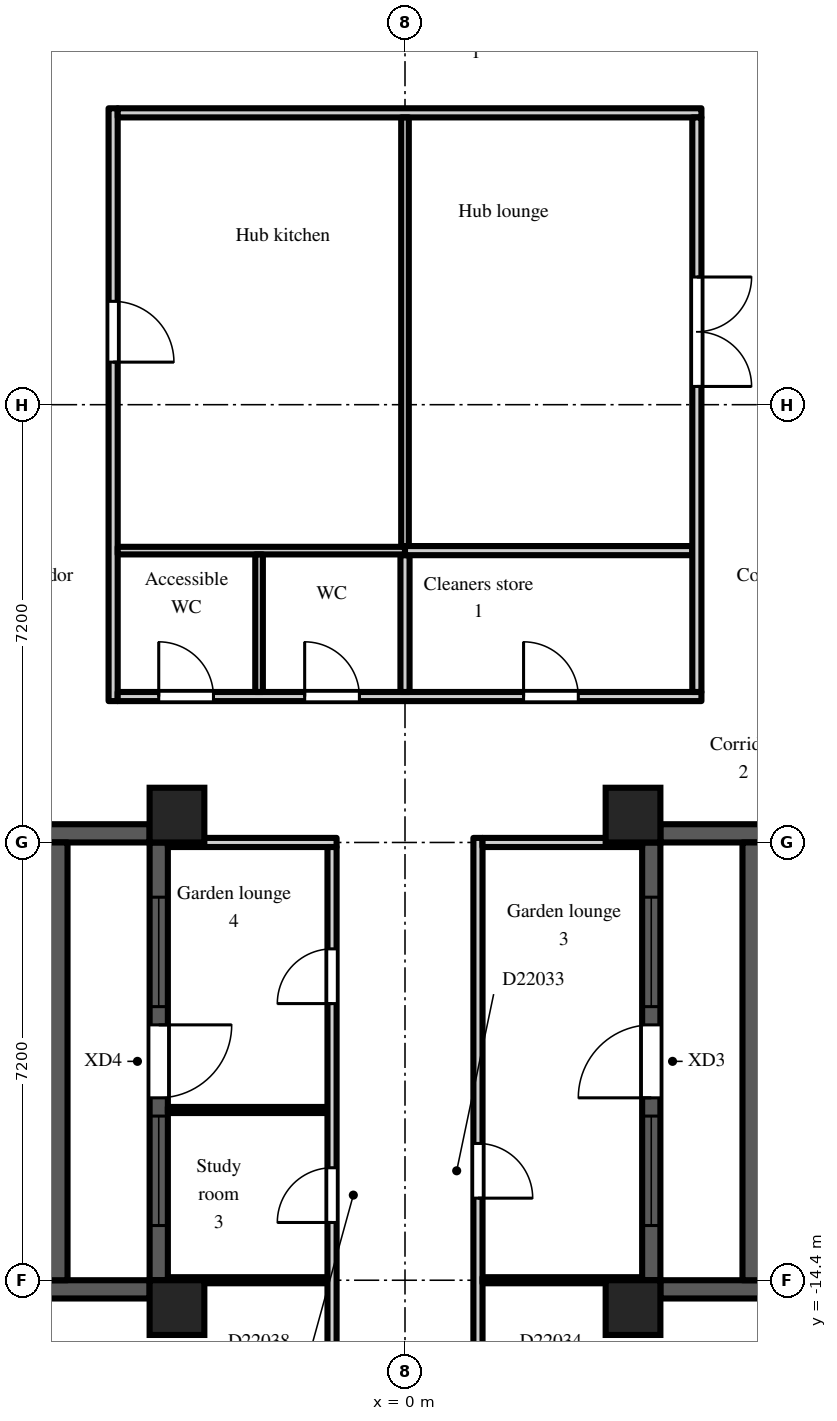
"""IFC4 building model, lengths in metres.
Left out: names, types, materials, properties, quantities, classifications, styles, units other than length and angle.
Written with IfcOpenShell. Run it as: python <this file> out.ifc"""

import sys

from ifc_helpers import new_model, si_unit, direction, frame, frame_2d, origin, origin_2d, place, context, subcontext, project, spatial, rectangle, extrude, element, fill, save


model = new_model("IFC4")
c1 = context("Model", 3, precision=1e-05, world=origin(), true_north=direction((0.0, 1.0)))
c2 = subcontext(c1, "Body", "Model", "MODEL_VIEW")
j1 = project(units=[si_unit("LENGTHUNIT", "METRE"), si_unit("PLANEANGLEUNIT", "RADIAN")], contexts=[c1])
p1 = place(None, origin())
s1 = spatial("IfcSite", under=j1, at=p1, CompositionType="ELEMENT")
p2 = place(p1, origin())
s2 = spatial("IfcBuilding", under=s1, at=p2, CompositionType="ELEMENT")
p3 = place(p2, frame((0.0, 0.0, 159.3)))
s3 = spatial("IfcBuildingStorey", under=s2, at=p3, CompositionType="ELEMENT", Elevation=159.3)
for number, where, z_axis, x_axis in (
    (1, (-3.75, -14.85, 0.0), (0.0, 0.0, 1.0), (1.0, 0.0, 0.0)),
    (2, (-3.75, -6.75, 0.0), (0.0, 0.0, 1.0), (1.0, 0.0, 0.0)),
    (3, (3.75, -14.85, 0.0), (0.0, 0.0, 1.0), (1.0, 0.0, 0.0)),
    (4, (3.75, -6.75, 0.0), (0.0, 0.0, 1.0), (1.0, 0.0, 0.0)),
):
    element("IfcColumn", number, at=place(p3, frame(where, z_axis=z_axis, x_axis=x_axis)), inside=s3, PredefinedType="COLUMN", context=c2, shape_type="SweptSolid", body=[
        extrude(rectangle(XDim=0.9, YDim=0.9, at=origin_2d()), origin(), (0.0, 0.0, 1.0), 3.0),
    ])
p4 = place(p3, frame((-7.2, -7.05, 0.0), z_axis=(0.0, 0.0, 1.0), x_axis=(1.0, 0.0, 0.0)))
e5 = element("IfcWall", 5, at=p4, inside=s3, PredefinedType="SOLIDWALL", context=c2, shape_type="SweptSolid", body=[
    extrude(rectangle(XDim=3.0, YDim=0.3, at=frame_2d((1.5, 0.0))), origin(), (0.0, 0.0, 1.0), 2.55),
])
p5 = place(p3, frame((-4.05, -7.2, 0.0), z_axis=(0.0, 0.0, 1.0), x_axis=(0.0, -1.0, 0.0)))
e6 = element("IfcWall", 6, at=p5, inside=s3, PredefinedType="SOLIDWALL", context=c2, shape_type="SweptSolid", body=[
    extrude(rectangle(XDim=7.2, YDim=0.3, at=frame_2d((3.6, 0.0))), origin(), (0.0, 0.0, 1.0), 2.55),
])
p6 = place(p5, frame((3.0, 0.0, 0.0)))
e7 = element("IfcOpeningElement", 7, at=p6, cuts=e6, PredefinedType="OPENING", context=c2, shape_type="SweptSolid", body=[
    extrude(rectangle(XDim=1.2, YDim=2.05, at=frame_2d((0.6, 1.025))), frame((0.0, 0.16, 0.0), z_axis=(0.0, -1.0, 0.0), x_axis=(1.0, 0.0, 0.0)), (0.0, 0.0, 1.0), 0.32),
])
p7 = place(p5, frame((0.9, 0.0, 0.2)))
e8 = element("IfcOpeningElement", 8, at=p7, cuts=e6, PredefinedType="OPENING", context=c2, shape_type="SweptSolid", body=[
    extrude(rectangle(XDim=1.8, YDim=1.85, at=frame_2d((0.9, 0.925))), frame((0.0, 0.16, 0.0), z_axis=(0.0, -1.0, 0.0), x_axis=(1.0, 0.0, 0.0)), (0.0, 0.0, 1.0), 0.32),
])
p8 = place(p5, frame((4.5, 0.0, 0.2)))
e9 = element("IfcOpeningElement", 9, at=p8, cuts=e6, PredefinedType="OPENING", context=c2, shape_type="SweptSolid", body=[
    extrude(rectangle(XDim=1.8, YDim=1.85, at=frame_2d((0.9, 0.925))), frame((0.0, 0.16, 0.0), z_axis=(0.0, -1.0, 0.0), x_axis=(1.0, 0.0, 0.0)), (0.0, 0.0, 1.0), 0.32),
])
for number, where, z_axis, x_axis in (
    (10, (-4.2, -14.55, 0.0), (0.0, 0.0, 1.0), (-1.0, 0.0, 0.0)),
    (11, (6.3, -14.55, 0.0), (0.0, 0.0, 1.0), (-1.0, 0.0, 0.0)),
):
    element("IfcWall", number, at=place(p3, frame(where, z_axis=z_axis, x_axis=x_axis)), inside=s3, PredefinedType="SOLIDWALL", context=c2, shape_type="SweptSolid", body=[
        extrude(rectangle(XDim=2.1, YDim=0.3, at=frame_2d((1.05, 0.0))), origin(), (0.0, 0.0, 1.0), 2.55),
    ])
p9 = place(p3, frame((4.05, -14.4, 0.0), z_axis=(0.0, 0.0, 1.0), x_axis=(0.0, 1.0, 0.0)))
e12 = element("IfcWall", 12, at=p9, inside=s3, PredefinedType="SOLIDWALL", context=c2, shape_type="SweptSolid", body=[
    extrude(rectangle(XDim=7.2, YDim=0.3, at=frame_2d((3.6, 0.0))), origin(), (0.0, 0.0, 1.0), 2.55),
])
p10 = place(p9, frame((3.0, 0.0, 0.0)))
e13 = element("IfcOpeningElement", 13, at=p10, cuts=e12, PredefinedType="OPENING", context=c2, shape_type="SweptSolid", body=[
    extrude(rectangle(XDim=1.2, YDim=2.05, at=frame_2d((0.6, 1.025))), frame((0.0, 0.16, 0.0), z_axis=(0.0, -1.0, 0.0), x_axis=(1.0, 0.0, 0.0)), (0.0, 0.0, 1.0), 0.32),
])
p11 = place(p9, frame((0.9, 0.0, 0.2)))
e14 = element("IfcOpeningElement", 14, at=p11, cuts=e12, PredefinedType="OPENING", context=c2, shape_type="SweptSolid", body=[
    extrude(rectangle(XDim=1.8, YDim=1.85, at=frame_2d((0.9, 0.925))), frame((0.0, 0.16, 0.0), z_axis=(0.0, -1.0, 0.0), x_axis=(1.0, 0.0, 0.0)), (0.0, 0.0, 1.0), 0.32),
])
p12 = place(p9, frame((4.5, 0.0, 0.2)))
e15 = element("IfcOpeningElement", 15, at=p12, cuts=e12, PredefinedType="OPENING", context=c2, shape_type="SweptSolid", body=[
    extrude(rectangle(XDim=1.8, YDim=1.85, at=frame_2d((0.9, 0.925))), frame((0.0, 0.16, 0.0), z_axis=(0.0, -1.0, 0.0), x_axis=(1.0, 0.0, 0.0)), (0.0, 0.0, 1.0), 0.32),
])
p13 = place(p3, frame((4.2, -7.05, 0.0), z_axis=(0.0, 0.0, 1.0), x_axis=(1.0, 0.0, 0.0)))
e16 = element("IfcWall", 16, at=p13, inside=s3, PredefinedType="SOLIDWALL", context=c2, shape_type="SweptSolid", body=[
    extrude(rectangle(XDim=3.0, YDim=0.3, at=frame_2d((1.5, 0.0))), origin(), (0.0, 0.0, 1.0), 2.55),
])
for number, where, z_axis, x_axis in (
    (17, (6.0, -14.4, 0.0), (0.0, 0.0, 1.0), (0.0, 1.0, 0.0)),
    (18, (-6.0, -14.4, 0.0), (0.0, 0.0, 1.0), (0.0, 1.0, 0.0)),
):
    element("IfcWall", number, at=place(p3, frame(where, z_axis=z_axis, x_axis=x_axis)), inside=s3, PredefinedType="PARAPET", context=c2, shape_type="SweptSolid", body=[
        extrude(rectangle(XDim=7.2, YDim=0.9, at=frame_2d((3.6, 0.0))), origin(), (0.0, 0.0, 1.0), 0.8),
    ])
p14 = place(p3, frame((-4.8, -4.875, 0.0), z_axis=(0.0, 0.0, 1.0), x_axis=(0.0, 1.0, 0.0)))
e19 = element("IfcWall", 19, at=p14, inside=s3, PredefinedType="PARTITIONING", context=c2, shape_type="SweptSolid", body=[
    extrude(rectangle(XDim=9.75, YDim=0.15, at=frame_2d((4.875, 0.0))), origin(), (0.0, 0.0, 1.0), 2.55),
])
p15 = place(p14, frame((5.575, 0.0, 0.0)))
e20 = element("IfcOpeningElement", 20, at=p15, cuts=e19, PredefinedType="OPENING", context=c2, shape_type="SweptSolid", body=[
    extrude(rectangle(XDim=1.0, YDim=2.1, at=frame_2d((0.5, 1.05))), frame((0.0, 0.085, 0.0), z_axis=(0.0, -1.0, 0.0), x_axis=(1.0, 0.0, 0.0)), (0.0, 0.0, 1.0), 0.17),
])
p16 = place(p3, frame((-4.725, -4.8, 0.0), z_axis=(0.0, 0.0, 1.0), x_axis=(1.0, 0.0, 0.0)))
e21 = element("IfcWall", 21, at=p16, inside=s3, PredefinedType="PARTITIONING", context=c2, shape_type="SweptSolid", body=[
    extrude(rectangle(XDim=9.6, YDim=0.15, at=frame_2d((4.8, 0.0))), origin(), (0.0, 0.0, 1.0), 2.55),
])
p17 = place(p16, frame((0.675, 0.0, 0.0)))
e22 = element("IfcOpeningElement", 22, at=p17, cuts=e21, PredefinedType="OPENING", context=c2, shape_type="SweptSolid", body=[
    extrude(rectangle(XDim=0.9, YDim=2.1, at=frame_2d((0.45, 1.05))), frame((0.0, 0.085, 0.0), z_axis=(0.0, -1.0, 0.0), x_axis=(1.0, 0.0, 0.0)), (0.0, 0.0, 1.0), 0.17),
])
p18 = place(p16, frame((3.075, 0.0, 0.0)))
e23 = element("IfcOpeningElement", 23, at=p18, cuts=e21, PredefinedType="OPENING", context=c2, shape_type="SweptSolid", body=[
    extrude(rectangle(XDim=0.9, YDim=2.1, at=frame_2d((0.45, 1.05))), frame((0.0, 0.085, 0.0), z_axis=(0.0, -1.0, 0.0), x_axis=(1.0, 0.0, 0.0)), (0.0, 0.0, 1.0), 0.17),
])
p19 = place(p16, frame((6.675, 0.0, 0.0)))
e24 = element("IfcOpeningElement", 24, at=p19, cuts=e21, PredefinedType="OPENING", context=c2, shape_type="SweptSolid", body=[
    extrude(rectangle(XDim=0.9, YDim=2.1, at=frame_2d((0.45, 1.05))), frame((0.0, 0.085, 0.0), z_axis=(0.0, -1.0, 0.0), x_axis=(1.0, 0.0, 0.0)), (0.0, 0.0, 1.0), 0.17),
])
p20 = place(p3, frame((-4.725, -2.4, 0.0), z_axis=(0.0, 0.0, 1.0), x_axis=(1.0, 0.0, 0.0)))
e25 = element("IfcWall", 25, at=p20, inside=s3, PredefinedType="PARTITIONING", context=c2, shape_type="SweptSolid", body=[
    extrude(rectangle(XDim=4.725, YDim=0.125, at=frame_2d((2.363, 0.0))), origin(), (0.0, 0.0, 1.0), 2.55),
])
p21 = place(p3, frame((-4.725, 4.8, 0.0), z_axis=(0.0, 0.0, 1.0), x_axis=(1.0, 0.0, 0.0)))
e26 = element("IfcWall", 26, at=p21, inside=s3, PredefinedType="PARTITIONING", context=c2, shape_type="SweptSolid", body=[
    extrude(rectangle(XDim=9.6, YDim=0.15, at=frame_2d((4.8, 0.0))), origin(), (0.0, 0.0, 1.0), 2.55),
])
for number, where, z_axis, x_axis in (
    (27, (-3.9, -14.4, 0.0), (0.0, 0.0, 1.0), (1.0, 0.0, 0.0)),
    (28, (-3.9, -11.6, 0.0), (0.0, 0.0, 1.0), (1.0, 0.0, 0.0)),
):
    element("IfcWall", number, at=place(p3, frame(where, z_axis=z_axis, x_axis=x_axis)), inside=s3, PredefinedType="PARTITIONING", context=c2, shape_type="SweptSolid", body=[
        extrude(rectangle(XDim=2.625, YDim=0.1, at=frame_2d((1.312, 0.0))), origin(), (0.0, 0.0, 1.0), 2.55),
    ])
p22 = place(p3, frame((-3.9, -7.2, 0.0), z_axis=(0.0, 0.0, 1.0), x_axis=(1.0, 0.0, 0.0)))
e29 = element("IfcWall", 29, at=p22, inside=s3, PredefinedType="PARTITIONING", context=c2, shape_type="SweptSolid", body=[
    extrude(rectangle(XDim=2.775, YDim=0.15, at=frame_2d((1.387, 0.0))), origin(), (0.0, 0.0, 1.0), 2.55),
])
p23 = place(p3, frame((-2.4, -4.725, 0.0), z_axis=(0.0, 0.0, 1.0), x_axis=(0.0, 1.0, 0.0)))
e30 = element("IfcWall", 30, at=p23, inside=s3, PredefinedType="PARTITIONING", context=c2, shape_type="SweptSolid", body=[
    extrude(rectangle(XDim=2.263, YDim=0.125, at=frame_2d((1.131, 0.0))), origin(), (0.0, 0.0, 1.0), 2.55),
])
p24 = place(p3, frame((-1.2, -21.3, 0.0), z_axis=(0.0, 0.0, 1.0), x_axis=(0.0, 1.0, 0.0)))
e31 = element("IfcWall", 31, at=p24, inside=s3, PredefinedType="PARTITIONING", context=c2, shape_type="SweptSolid", body=[
    extrude(rectangle(XDim=14.025, YDim=0.15, at=frame_2d((7.013, 0.0))), origin(), (0.0, 0.0, 1.0), 2.55),
])
p25 = place(p24, frame((7.85, 0.0, 0.0)))
e32 = element("IfcOpeningElement", 32, at=p25, cuts=e31, PredefinedType="OPENING", context=c2, shape_type="SweptSolid", body=[
    extrude(rectangle(XDim=0.9, YDim=2.1, at=frame_2d((0.45, 1.05))), frame((0.0, 0.085, 0.0), z_axis=(0.0, -1.0, 0.0), x_axis=(1.0, 0.0, 0.0)), (0.0, 0.0, 1.0), 0.17),
])
p26 = place(p24, frame((11.45, 0.0, 0.0)))
e33 = element("IfcOpeningElement", 33, at=p26, cuts=e31, PredefinedType="OPENING", context=c2, shape_type="SweptSolid", body=[
    extrude(rectangle(XDim=0.9, YDim=2.1, at=frame_2d((0.45, 1.05))), frame((0.0, 0.085, 0.0), z_axis=(0.0, -1.0, 0.0), x_axis=(1.0, 0.0, 0.0)), (0.0, 0.0, 1.0), 0.17),
])
p27 = place(p24, frame((2.1, 0.0, 0.0)))
e34 = element("IfcOpeningElement", 34, at=p27, cuts=e31, PredefinedType="OPENING", context=c2, shape_type="SweptSolid", body=[
    extrude(rectangle(XDim=1.0, YDim=2.1, at=frame_2d((0.5, 1.05))), frame((0.0, 0.085, 0.0), z_axis=(0.0, -1.0, 0.0), x_axis=(1.0, 0.0, 0.0)), (0.0, 0.0, 1.0), 0.17),
])
p28 = place(p3, frame((0.0, -4.725, 0.0), z_axis=(0.0, 0.0, 1.0), x_axis=(0.0, 1.0, 0.0)))
e35 = element("IfcWall", 35, at=p28, inside=s3, PredefinedType="PARTITIONING", context=c2, shape_type="SweptSolid", body=[
    extrude(rectangle(XDim=2.25, YDim=0.15, at=frame_2d((1.125, 0.0))), origin(), (0.0, 0.0, 1.0), 2.55),
])
p29 = place(p3, frame((0.0, -2.325, 0.0), z_axis=(0.0, 0.0, 1.0), x_axis=(0.0, 1.0, 0.0)))
e36 = element("IfcWall", 36, at=p29, inside=s3, PredefinedType="PARTITIONING", context=c2, shape_type="SweptSolid", body=[
    extrude(rectangle(XDim=7.05, YDim=0.125, at=frame_2d((3.525, 0.0))), origin(), (0.0, 0.0, 1.0), 2.55),
])
p30 = place(p3, frame((0.0, -2.4, 0.0), z_axis=(0.0, 0.0, 1.0), x_axis=(1.0, 0.0, 0.0)))
e37 = element("IfcWall", 37, at=p30, inside=s3, PredefinedType="PARTITIONING", context=c2, shape_type="SweptSolid", body=[
    extrude(rectangle(XDim=4.725, YDim=0.15, at=frame_2d((2.363, 0.0))), origin(), (0.0, 0.0, 1.0), 2.55),
])
p31 = place(p3, frame((1.2, -21.3, 0.0), z_axis=(0.0, 0.0, 1.0), x_axis=(0.0, 1.0, 0.0)))
e38 = element("IfcWall", 38, at=p31, inside=s3, PredefinedType="PARTITIONING", context=c2, shape_type="SweptSolid", body=[
    extrude(rectangle(XDim=14.175, YDim=0.15, at=frame_2d((7.087, 0.0))), origin(), (0.0, 0.0, 1.0), 2.55),
])
p32 = place(p31, frame((8.25, 0.0, 0.0)))
e39 = element("IfcOpeningElement", 39, at=p32, cuts=e38, PredefinedType="OPENING", context=c2, shape_type="SweptSolid", body=[
    extrude(rectangle(XDim=0.9, YDim=2.1, at=frame_2d((0.45, 1.05))), frame((0.0, 0.085, 0.0), z_axis=(0.0, -1.0, 0.0), x_axis=(1.0, 0.0, 0.0)), (0.0, 0.0, 1.0), 0.17),
])
p33 = place(p31, frame((0.2, 0.0, 0.0)))
e40 = element("IfcOpeningElement", 40, at=p33, cuts=e38, PredefinedType="OPENING", context=c2, shape_type="SweptSolid", body=[
    extrude(rectangle(XDim=1.0, YDim=2.1, at=frame_2d((0.5, 1.05))), frame((0.0, 0.085, 0.0), z_axis=(0.0, -1.0, 0.0), x_axis=(1.0, 0.0, 0.0)), (0.0, 0.0, 1.0), 0.17),
])
p34 = place(p3, frame((1.275, -14.4, 0.0), z_axis=(0.0, 0.0, 1.0), x_axis=(1.0, 0.0, 0.0)))
e41 = element("IfcWall", 41, at=p34, inside=s3, PredefinedType="PARTITIONING", context=c2, shape_type="SweptSolid", body=[
    extrude(rectangle(XDim=2.625, YDim=0.1, at=frame_2d((1.312, 0.0))), origin(), (0.0, 0.0, 1.0), 2.55),
])
p35 = place(p3, frame((1.275, -7.2, 0.0), z_axis=(0.0, 0.0, 1.0), x_axis=(1.0, 0.0, 0.0)))
e42 = element("IfcWall", 42, at=p35, inside=s3, PredefinedType="PARTITIONING", context=c2, shape_type="SweptSolid", body=[
    extrude(rectangle(XDim=2.625, YDim=0.15, at=frame_2d((1.312, 0.0))), origin(), (0.0, 0.0, 1.0), 2.55),
])
p36 = place(p3, frame((4.8, -4.725, 0.0), z_axis=(0.0, 0.0, 1.0), x_axis=(0.0, 1.0, 0.0)))
e43 = element("IfcWall", 43, at=p36, inside=s3, PredefinedType="PARTITIONING", context=c2, shape_type="SweptSolid", body=[
    extrude(rectangle(XDim=9.45, YDim=0.15, at=frame_2d((4.725, 0.0))), origin(), (0.0, 0.0, 1.0), 2.55),
])
p37 = place(p36, frame((5.025, 0.0, 0.0)))
e44 = element("IfcOpeningElement", 44, at=p37, cuts=e43, PredefinedType="OPENING", context=c2, shape_type="SweptSolid", body=[
    extrude(rectangle(XDim=1.8, YDim=2.1, at=frame_2d((0.9, 1.05))), frame((0.0, 0.085, 0.0), z_axis=(0.0, -1.0, 0.0), x_axis=(1.0, 0.0, 0.0)), (0.0, 0.0, 1.0), 0.17),
])
p38 = place(p6, origin())
e45 = element("IfcDoor", 45, at=p38, inside=s3, OperationType="SINGLE_SWING_LEFT", PredefinedType="DOOR", context=c2, shape_type="SweptSolid", body=[
    extrude(rectangle(XDim=1.2, YDim=2.05, at=frame_2d((0.6, 1.025))), frame((0.0, 0.025, 0.0), z_axis=(0.0, -1.0, 0.0), x_axis=(1.0, 0.0, 0.0)), (0.0, 0.0, 1.0), 0.05),
])
fill(e7, e45)
p39 = place(p7, origin())
e46 = element("IfcWindow", 46, at=p39, inside=s3, PartitioningType="SINGLE_PANEL", PredefinedType="WINDOW", context=c2, shape_type="SweptSolid", body=[
    extrude(rectangle(XDim=1.8, YDim=1.85, at=frame_2d((0.9, 0.925))), frame((0.0, 0.03, 0.0), z_axis=(0.0, -1.0, 0.0), x_axis=(1.0, 0.0, 0.0)), (0.0, 0.0, 1.0), 0.06),
])
fill(e8, e46)
p40 = place(p8, origin())
e47 = element("IfcWindow", 47, at=p40, inside=s3, PartitioningType="SINGLE_PANEL", PredefinedType="WINDOW", context=c2, shape_type="SweptSolid", body=[
    extrude(rectangle(XDim=1.8, YDim=1.85, at=frame_2d((0.9, 0.925))), frame((0.0, 0.03, 0.0), z_axis=(0.0, -1.0, 0.0), x_axis=(1.0, 0.0, 0.0)), (0.0, 0.0, 1.0), 0.06),
])
fill(e9, e47)
p41 = place(p10, origin())
e48 = element("IfcDoor", 48, at=p41, inside=s3, OperationType="SINGLE_SWING_LEFT", PredefinedType="DOOR", context=c2, shape_type="SweptSolid", body=[
    extrude(rectangle(XDim=1.2, YDim=2.05, at=frame_2d((0.6, 1.025))), frame((0.0, 0.025, 0.0), z_axis=(0.0, -1.0, 0.0), x_axis=(1.0, 0.0, 0.0)), (0.0, 0.0, 1.0), 0.05),
])
fill(e13, e48)
p42 = place(p11, origin())
e49 = element("IfcWindow", 49, at=p42, inside=s3, PartitioningType="SINGLE_PANEL", PredefinedType="WINDOW", context=c2, shape_type="SweptSolid", body=[
    extrude(rectangle(XDim=1.8, YDim=1.85, at=frame_2d((0.9, 0.925))), frame((0.0, 0.03, 0.0), z_axis=(0.0, -1.0, 0.0), x_axis=(1.0, 0.0, 0.0)), (0.0, 0.0, 1.0), 0.06),
])
fill(e14, e49)
p43 = place(p12, origin())
e50 = element("IfcWindow", 50, at=p43, inside=s3, PartitioningType="SINGLE_PANEL", PredefinedType="WINDOW", context=c2, shape_type="SweptSolid", body=[
    extrude(rectangle(XDim=1.8, YDim=1.85, at=frame_2d((0.9, 0.925))), frame((0.0, 0.03, 0.0), z_axis=(0.0, -1.0, 0.0), x_axis=(1.0, 0.0, 0.0)), (0.0, 0.0, 1.0), 0.06),
])
fill(e15, e50)
p44 = place(p17, origin())
e51 = element("IfcDoor", 51, at=p44, inside=s3, OperationType="SINGLE_SWING_LEFT", PredefinedType="DOOR", context=c2, shape_type="SweptSolid", body=[
    extrude(rectangle(XDim=0.9, YDim=2.1, at=frame_2d((0.45, 1.05))), frame((0.0, 0.025, 0.0), z_axis=(0.0, -1.0, 0.0), x_axis=(1.0, 0.0, 0.0)), (0.0, 0.0, 1.0), 0.05),
])
fill(e22, e51)
p45 = place(p18, origin())
e52 = element("IfcDoor", 52, at=p45, inside=s3, OperationType="SINGLE_SWING_LEFT", PredefinedType="DOOR", context=c2, shape_type="SweptSolid", body=[
    extrude(rectangle(XDim=0.9, YDim=2.1, at=frame_2d((0.45, 1.05))), frame((0.0, 0.025, 0.0), z_axis=(0.0, -1.0, 0.0), x_axis=(1.0, 0.0, 0.0)), (0.0, 0.0, 1.0), 0.05),
])
fill(e23, e52)
p46 = place(p19, origin())
e53 = element("IfcDoor", 53, at=p46, inside=s3, OperationType="SINGLE_SWING_LEFT", PredefinedType="DOOR", context=c2, shape_type="SweptSolid", body=[
    extrude(rectangle(XDim=0.9, YDim=2.1, at=frame_2d((0.45, 1.05))), frame((0.0, 0.025, 0.0), z_axis=(0.0, -1.0, 0.0), x_axis=(1.0, 0.0, 0.0)), (0.0, 0.0, 1.0), 0.05),
])
fill(e24, e53)
p47 = place(p15, frame((1.0, 0.0, 0.0), z_axis=(0.0, 0.0, 1.0), x_axis=(-1.0, 0.0, 0.0)))
e54 = element("IfcDoor", 54, at=p47, inside=s3, OperationType="SINGLE_SWING_RIGHT", PredefinedType="DOOR", context=c2, shape_type="SweptSolid", body=[
    extrude(rectangle(XDim=1.0, YDim=2.1, at=frame_2d((0.5, 1.05))), frame((0.0, 0.025, 0.0), z_axis=(0.0, -1.0, 0.0), x_axis=(1.0, 0.0, 0.0)), (0.0, 0.0, 1.0), 0.05),
])
fill(e20, e54)
p48 = place(p37, frame((1.8, 0.0, 0.0), z_axis=(0.0, 0.0, 1.0), x_axis=(-1.0, 0.0, 0.0)))
e55 = element("IfcDoor", 55, at=p48, inside=s3, OperationType="DOUBLE_DOOR_DOUBLE_SWING", PredefinedType="DOOR", context=c2, shape_type="SweptSolid", body=[
    extrude(rectangle(XDim=1.8, YDim=2.1, at=frame_2d((0.9, 1.05))), frame((0.0, 0.025, 0.0), z_axis=(0.0, -1.0, 0.0), x_axis=(1.0, 0.0, 0.0)), (0.0, 0.0, 1.0), 0.05),
])
fill(e44, e55)
p49 = place(p32, frame((0.9, 0.0, 0.0), z_axis=(0.0, 0.0, 1.0), x_axis=(-1.0, 0.0, 0.0)))
e56 = element("IfcDoor", 56, at=p49, inside=s3, OperationType="SINGLE_SWING_RIGHT", PredefinedType="DOOR", context=c2, shape_type="SweptSolid", body=[
    extrude(rectangle(XDim=0.9, YDim=2.1, at=frame_2d((0.45, 1.05))), frame((0.0, 0.025, 0.0), z_axis=(0.0, -1.0, 0.0), x_axis=(1.0, 0.0, 0.0)), (0.0, 0.0, 1.0), 0.05),
])
fill(e39, e56)
p50 = place(p25, origin())
e57 = element("IfcDoor", 57, at=p50, inside=s3, OperationType="SINGLE_SWING_LEFT", PredefinedType="DOOR", context=c2, shape_type="SweptSolid", body=[
    extrude(rectangle(XDim=0.9, YDim=2.1, at=frame_2d((0.45, 1.05))), frame((0.0, 0.025, 0.0), z_axis=(0.0, -1.0, 0.0), x_axis=(1.0, 0.0, 0.0)), (0.0, 0.0, 1.0), 0.05),
])
fill(e32, e57)
p51 = place(p26, origin())
e58 = element("IfcDoor", 58, at=p51, inside=s3, OperationType="SINGLE_SWING_LEFT", PredefinedType="DOOR", context=c2, shape_type="SweptSolid", body=[
    extrude(rectangle(XDim=0.9, YDim=2.1, at=frame_2d((0.45, 1.05))), frame((0.0, 0.025, 0.0), z_axis=(0.0, -1.0, 0.0), x_axis=(1.0, 0.0, 0.0)), (0.0, 0.0, 1.0), 0.05),
])
fill(e33, e58)
save(model, sys.argv[1])
